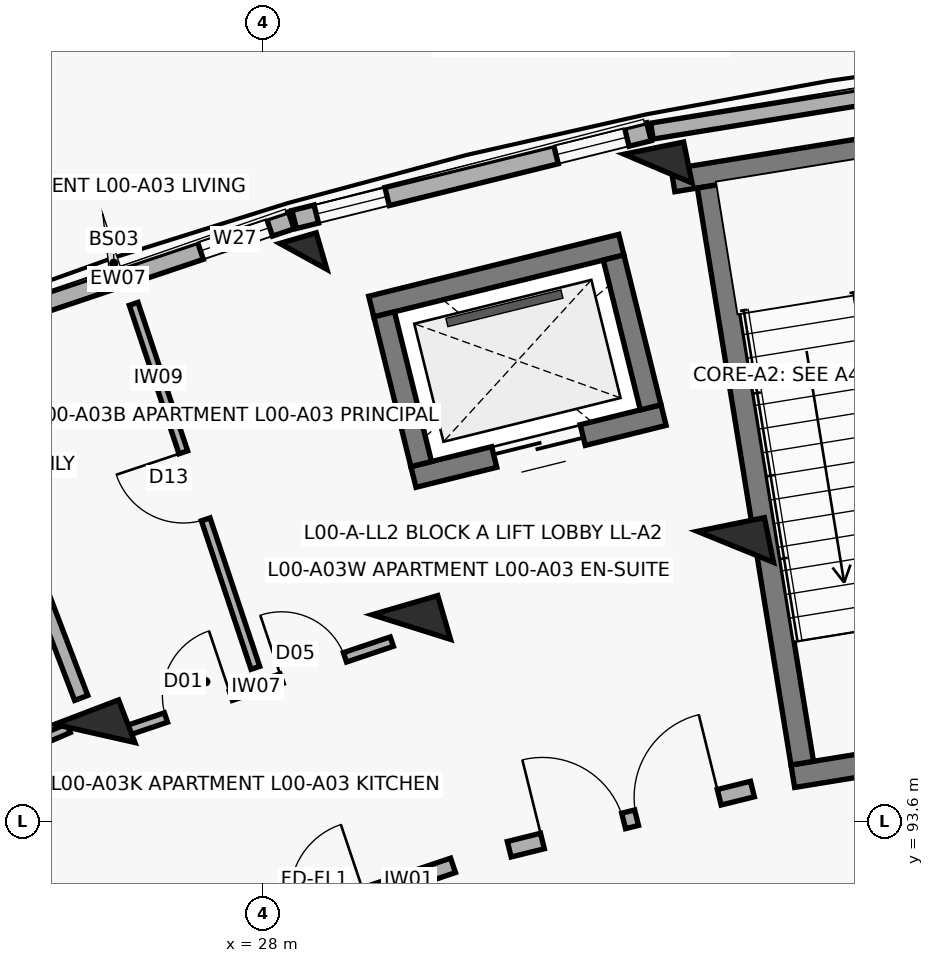
"""IFC4 building model, lengths in metres.
Left out: names, types, materials, properties, quantities, classifications, styles, units other than length and angle.
Written with IfcOpenShell. Run it as: python <this file> out.ifc"""

import sys

from ifc_helpers import new_model, si_unit, direction, frame, frame_2d, origin, origin_2d, place, context, subcontext, project, spatial, rectangle, extrude, element, fill, save


model = new_model("IFC4")
c1 = context("Model", 3, precision=1e-05, world=origin(), true_north=direction((0.0, 1.0)))
c2 = subcontext(c1, "Body", "Model", "MODEL_VIEW")
j1 = project(units=[si_unit("LENGTHUNIT", "METRE"), si_unit("PLANEANGLEUNIT", "RADIAN")], contexts=[c1])
p1 = place(None, origin())
s1 = spatial("IfcSite", under=j1, at=p1, CompositionType="ELEMENT")
p2 = place(p1, origin())
s2 = spatial("IfcBuilding", under=s1, at=p2, CompositionType="ELEMENT")
p3 = place(p2, origin())
s3 = spatial("IfcBuildingStorey", under=s2, at=p3, CompositionType="ELEMENT", Elevation=0.0)
for number, where, z_axis, x_axis in (
    (1, (25.79, 94.753, 0.0), (0.0, 0.0, 1.0), (-0.357, 0.934, 0.0)),
    (2, (29.954, 96.153, 0.0), (0.0, 0.0, 1.0), (-0.28, 0.96, 0.0)),
):
    element("IfcColumn", number, at=place(p3, frame(where, z_axis=z_axis, x_axis=x_axis)), inside=s3, PredefinedType="COLUMN", context=c2, shape_type="SweptSolid", body=[
        extrude(rectangle(XDim=0.6, YDim=0.9, at=origin_2d()), origin(), (0.0, 0.0, 1.0), 4.5),
    ])
p4 = place(p3, frame((28.533, 101.031, 0.0), z_axis=(0.0, 0.0, 1.0), x_axis=(-0.27966144946, 0.96009867914, 0.0)))
e3 = element("IfcColumn", 3, at=p4, inside=s3, PredefinedType="COLUMN", context=c2, shape_type="SweptSolid", body=[
    extrude(rectangle(XDim=0.5, YDim=0.5, at=origin_2d()), origin(), (0.0, 0.0, 1.0), 4.5),
])
p5 = place(p3, frame((34.219, 97.209, 0.0), z_axis=(0.0, 0.0, 1.0), x_axis=(-0.200393999665, 0.979715389742, 0.0)))
e4 = element("IfcColumn", 4, at=p5, inside=s3, PredefinedType="COLUMN", context=c2, shape_type="SweptSolid", body=[
    extrude(rectangle(XDim=0.6, YDim=0.9, at=origin_2d()), origin(), (0.0, 0.0, 1.0), 4.5),
])
p6 = place(p3, frame((33.201, 102.186, 0.0), z_axis=(0.0, 0.0, 1.0), x_axis=(-0.200393999665, 0.979715389742, 0.0)))
e5 = element("IfcColumn", 5, at=p6, inside=s3, PredefinedType="COLUMN", context=c2, shape_type="SweptSolid", body=[
    extrude(rectangle(XDim=0.55, YDim=0.8, at=origin_2d()), origin(), (0.0, 0.0, 1.0), 4.5),
])
p7 = place(p3, frame((23.816, 99.972, 0.0), z_axis=(0.0, 0.0, 1.0), x_axis=(0.947867898788, 0.318663531717, 0.0)))
e6 = element("IfcWall", 6, at=p7, inside=s3, PredefinedType="SOLIDWALL", context=c2, shape_type="SweptSolid", body=[
    extrude(rectangle(XDim=4.809, YDim=0.235, at=frame_2d((2.405, 0.0))), origin(), (0.0, 0.0, 1.0), 3.45),
])
p8 = place(p7, frame((0.3, 0.0, 0.3)))
e7 = element("IfcOpeningElement", 7, at=p8, cuts=e6, PredefinedType="OPENING", context=c2, shape_type="SweptSolid", body=[
    extrude(rectangle(XDim=0.96, YDim=1.42, at=frame_2d((0.48, 0.71))), frame((0.0, 0.127, 0.0), z_axis=(0.0, -1.0, 0.0), x_axis=(1.0, 0.0, 0.0)), (0.0, 0.0, 1.0), 0.255),
])
p9 = place(p7, frame((3.549, 0.0, 0.3)))
e8 = element("IfcOpeningElement", 8, at=p9, cuts=e6, PredefinedType="OPENING", context=c2, shape_type="SweptSolid", body=[
    extrude(rectangle(XDim=0.96, YDim=1.42, at=frame_2d((0.48, 0.71))), frame((0.0, 0.127, 0.0), z_axis=(0.0, -1.0, 0.0), x_axis=(1.0, 0.0, 0.0)), (0.0, 0.0, 1.0), 0.255),
])
p10 = place(p3, frame((28.413, 101.515, 0.0), z_axis=(0.0, 0.0, 1.0), x_axis=(0.970716115822, 0.240229520426, 0.0)))
e9 = element("IfcWall", 9, at=p10, inside=s3, PredefinedType="SOLIDWALL", context=c2, shape_type="SweptSolid", body=[
    extrude(rectangle(XDim=4.809, YDim=0.245, at=frame_2d((2.405, 0.0))), origin(), (0.0, 0.0, 1.0), 3.45),
])
p11 = place(p10, frame((0.3, 0.0, 0.3)))
e10 = element("IfcOpeningElement", 10, at=p11, cuts=e9, PredefinedType="OPENING", context=c2, shape_type="SweptSolid", body=[
    extrude(rectangle(XDim=0.96, YDim=1.56, at=frame_2d((0.48, 0.78))), frame((0.0, 0.133, 0.0), z_axis=(0.0, -1.0, 0.0), x_axis=(1.0, 0.0, 0.0)), (0.0, 0.0, 1.0), 0.265),
])
p12 = place(p10, frame((3.549, 0.0, 0.3)))
e11 = element("IfcOpeningElement", 11, at=p12, cuts=e9, PredefinedType="OPENING", context=c2, shape_type="SweptSolid", body=[
    extrude(rectangle(XDim=0.96, YDim=1.56, at=frame_2d((0.48, 0.78))), frame((0.0, 0.133, 0.0), z_axis=(0.0, -1.0, 0.0), x_axis=(1.0, 0.0, 0.0)), (0.0, 0.0, 1.0), 0.265),
])
p13 = place(p3, frame((33.12, 102.679, 0.0), z_axis=(0.0, 0.0, 1.0), x_axis=(0.987080750493, 0.160223568819, 0.0)))
e12 = element("IfcWall", 12, at=p13, inside=s3, PredefinedType="SOLIDWALL", context=c2, shape_type="SweptSolid", body=[
    extrude(rectangle(XDim=4.809, YDim=0.212, at=frame_2d((2.404, 0.0))), origin(), (0.0, 0.0, 1.0), 3.45),
])
p14 = place(p3, frame((38.794, 94.811, 0.0), z_axis=(0.0, 0.0, 1.0), x_axis=(-0.987077443397, -0.160243941341, 0.0)))
e13 = element("IfcWall", 13, at=p14, inside=s3, PredefinedType="SHEAR", context=c2, shape_type="SweptSolid", body=[
    extrude(rectangle(XDim=3.87, YDim=0.3, at=frame_2d((1.935, 0.0))), origin(), (0.0, 0.0, 1.0), 4.5),
])
p15 = place(p14, frame((1.41, 0.0, 0.0)))
e14 = element("IfcOpeningElement", 14, at=p15, cuts=e13, PredefinedType="OPENING", context=c2, shape_type="SweptSolid", body=[
    extrude(rectangle(XDim=1.05, YDim=2.15, at=frame_2d((0.525, 1.075))), frame((0.0, 0.16, 0.0), z_axis=(0.0, -1.0, 0.0), x_axis=(1.0, 0.0, 0.0)), (0.0, 0.0, 1.0), 0.32),
])
p16 = place(p3, frame((37.81, 102.745, 0.0), z_axis=(0.0, 0.0, 1.0), x_axis=(-0.987084710126, -0.160199173019, 0.0)))
e15 = element("IfcWall", 15, at=p16, inside=s3, PredefinedType="SHEAR", context=c2, shape_type="SweptSolid", body=[
    extrude(rectangle(XDim=4.47, YDim=0.3, at=frame_2d((2.235, 0.0))), origin(), (0.0, 0.0, 1.0), 4.5),
])
p17 = place(p3, frame((35.098, 94.363, 0.0), z_axis=(0.0, 0.0, 1.0), x_axis=(-0.160227496777, 0.987080112897, 0.0)))
e16 = element("IfcWall", 16, at=p17, inside=s3, PredefinedType="SHEAR", context=c2, shape_type="SweptSolid", body=[
    extrude(rectangle(XDim=7.69, YDim=0.3, at=frame_2d((3.845, 0.0))), origin(), (0.0, 0.0, 1.0), 4.5),
])
p18 = place(p3, frame((33.273, 98.942, 0.0), z_axis=(0.0, 0.0, 1.0), x_axis=(-0.970707542441, -0.240264160972, 0.0)))
e17 = element("IfcWall", 17, at=p18, inside=s3, PredefinedType="SHEAR", context=c2, shape_type="SweptSolid", body=[
    extrude(rectangle(XDim=3.39, YDim=0.28, at=frame_2d((1.695, 0.0))), origin(), (0.0, 0.0, 1.0), 4.5),
])
p19 = place(p18, frame((1.095, 0.0, 0.0)))
e18 = element("IfcOpeningElement", 18, at=p19, cuts=e17, PredefinedType="OPENING", context=c2, shape_type="SweptSolid", body=[
    extrude(rectangle(XDim=1.2, YDim=2.15, at=frame_2d((0.6, 1.075))), frame((0.0, 0.15, 0.0), z_axis=(0.0, -1.0, 0.0), x_axis=(1.0, 0.0, 0.0)), (0.0, 0.0, 1.0), 0.3),
])
p20 = place(p3, frame((32.718, 101.185, 0.0), z_axis=(0.0, 0.0, 1.0), x_axis=(-0.970711699588, -0.240247364777, 0.0)))
e19 = element("IfcWall", 19, at=p20, inside=s3, PredefinedType="SHEAR", context=c2, shape_type="SweptSolid", body=[
    extrude(rectangle(XDim=3.39, YDim=0.28, at=frame_2d((1.695, 0.0))), origin(), (0.0, 0.0, 1.0), 4.5),
])
p21 = place(p3, frame((33.104, 99.044, 0.0), z_axis=(0.0, 0.0, 1.0), x_axis=(-0.240186044774, 0.970726873995, 0.0)))
e20 = element("IfcWall", 20, at=p21, inside=s3, PredefinedType="SHEAR", context=c2, shape_type="SweptSolid", body=[
    extrude(rectangle(XDim=2.03, YDim=0.28, at=frame_2d((1.015, 0.0))), origin(), (0.0, 0.0, 1.0), 4.5),
])
p22 = place(p3, frame((30.085, 98.297, 0.0), z_axis=(0.0, 0.0, 1.0), x_axis=(-0.2402993748, 0.970698825832, 0.0)))
e21 = element("IfcWall", 21, at=p22, inside=s3, PredefinedType="SHEAR", context=c2, shape_type="SweptSolid", body=[
    extrude(rectangle(XDim=2.03, YDim=0.28, at=frame_2d((1.015, 0.0))), origin(), (0.0, 0.0, 1.0), 4.5),
])
p23 = place(p3, frame((21.943, 93.317, 0.0), z_axis=(0.0, 0.0, 1.0), x_axis=(0.918726854017, 0.394893615684, 0.0)))
e22 = element("IfcWall", 22, at=p23, inside=s3, PredefinedType="PARTITIONING", context=c2, shape_type="SweptSolid", body=[
    extrude(rectangle(XDim=3.81, YDim=0.125, at=frame_2d((1.905, 0.0))), origin(), (0.0, 0.0, 1.0), 3.34),
])
p24 = place(p23, frame((0.65, 0.0, 0.0)))
e23 = element("IfcOpeningElement", 23, at=p24, cuts=e22, PredefinedType="OPENING", context=c2, shape_type="SweptSolid", body=[
    extrude(rectangle(XDim=0.9, YDim=2.1, at=frame_2d((0.45, 1.05))), frame((0.0, 0.073, 0.0), z_axis=(0.0, -1.0, 0.0), x_axis=(1.0, 0.0, 0.0)), (0.0, 0.0, 1.0), 0.145),
])
p25 = place(p23, frame((2.28, 0.0, 0.0)))
e24 = element("IfcOpeningElement", 24, at=p25, cuts=e22, PredefinedType="OPENING", context=c2, shape_type="SweptSolid", body=[
    extrude(rectangle(XDim=0.88, YDim=2.1, at=frame_2d((0.44, 1.05))), frame((0.0, 0.073, 0.0), z_axis=(0.0, -1.0, 0.0), x_axis=(1.0, 0.0, 0.0)), (0.0, 0.0, 1.0), 0.145),
])
p26 = place(p3, frame((27.247, 91.923, 0.0), z_axis=(0.0, 0.0, 1.0), x_axis=(0.947863007629, 0.318678080151, 0.0)))
e25 = element("IfcWall", 25, at=p26, inside=s3, PredefinedType="SOLIDWALL", context=c2, shape_type="SweptSolid", body=[
    extrude(rectangle(XDim=3.436, YDim=0.2, at=frame_2d((1.718, 0.0))), origin(), (0.0, 0.0, 1.0), 3.34),
])
p27 = place(p26, frame((1.228, 0.0, 0.0)))
e26 = element("IfcOpeningElement", 26, at=p27, cuts=e25, PredefinedType="OPENING", context=c2, shape_type="SweptSolid", body=[
    extrude(rectangle(XDim=0.98, YDim=2.15, at=frame_2d((0.49, 1.075))), frame((0.0, 0.11, 0.0), z_axis=(0.0, -1.0, 0.0), x_axis=(1.0, 0.0, 0.0)), (0.0, 0.0, 1.0), 0.22),
])
p28 = place(p3, frame((26.11, 94.756, 0.0), z_axis=(0.0, 0.0, 1.0), x_axis=(0.947873924847, 0.318645606584, 0.0)))
e27 = element("IfcWall", 27, at=p28, inside=s3, PredefinedType="PARTITIONING", context=c2, shape_type="SweptSolid", body=[
    extrude(rectangle(XDim=3.785, YDim=0.13, at=frame_2d((1.893, 0.0))), origin(), (0.0, 0.0, 1.0), 3.34),
])
p29 = place(p28, frame((0.65, 0.0, 0.0)))
e28 = element("IfcOpeningElement", 28, at=p29, cuts=e27, PredefinedType="OPENING", context=c2, shape_type="SweptSolid", body=[
    extrude(rectangle(XDim=0.9, YDim=2.1, at=frame_2d((0.45, 1.05))), frame((0.0, 0.075, 0.0), z_axis=(0.0, -1.0, 0.0), x_axis=(1.0, 0.0, 0.0)), (0.0, 0.0, 1.0), 0.15),
])
p30 = place(p28, frame((2.255, 0.0, 0.0)))
e29 = element("IfcOpeningElement", 29, at=p30, cuts=e27, PredefinedType="OPENING", context=c2, shape_type="SweptSolid", body=[
    extrude(rectangle(XDim=0.88, YDim=2.1, at=frame_2d((0.44, 1.05))), frame((0.0, 0.075, 0.0), z_axis=(0.0, -1.0, 0.0), x_axis=(1.0, 0.0, 0.0)), (0.0, 0.0, 1.0), 0.15),
])
p31 = place(p3, frame((27.903, 95.616, 0.0), z_axis=(0.0, 0.0, 1.0), x_axis=(-0.31722829501, 0.948349201953, 0.0)))
e30 = element("IfcWall", 30, at=p31, inside=s3, PredefinedType="PARTITIONING", context=c2, shape_type="SweptSolid", body=[
    extrude(rectangle(XDim=5.05, YDim=0.12, at=frame_2d((2.525, 0.0))), origin(), (0.0, 0.0, 1.0), 3.34),
])
p32 = place(p31, frame((2.06, 0.0, 0.0)))
e31 = element("IfcOpeningElement", 31, at=p32, cuts=e30, PredefinedType="OPENING", context=c2, shape_type="SweptSolid", body=[
    extrude(rectangle(XDim=0.93, YDim=2.1, at=frame_2d((0.465, 1.05))), frame((0.0, 0.07, 0.0), z_axis=(0.0, -1.0, 0.0), x_axis=(1.0, 0.0, 0.0)), (0.0, 0.0, 1.0), 0.14),
])
p33 = place(p3, frame((25.611, 95.22, 0.0), z_axis=(0.0, 0.0, 1.0), x_axis=(-0.357064016205, 0.934079915388, 0.0)))
e32 = element("IfcWall", 32, at=p33, inside=s3, PredefinedType="SOLIDWALL", context=c2, shape_type="SweptSolid", body=[
    extrude(rectangle(XDim=4.35, YDim=0.185, at=frame_2d((2.175, 0.0))), origin(), (0.0, 0.0, 1.0), 3.34),
])
p34 = place(p3, frame((31.243, 93.23, 0.0), z_axis=(0.0, 0.0, 1.0), x_axis=(0.970719238682, 0.240216901263, 0.0)))
e33 = element("IfcWall", 33, at=p34, inside=s3, PredefinedType="SOLIDWALL", context=c2, shape_type="SweptSolid", body=[
    extrude(rectangle(XDim=3.296, YDim=0.21, at=frame_2d((1.648, 0.0))), origin(), (0.0, 0.0, 1.0), 3.34),
])
p35 = place(p34, frame((0.45, 0.0, 0.0)))
e34 = element("IfcOpeningElement", 34, at=p35, cuts=e33, PredefinedType="OPENING", context=c2, shape_type="SweptSolid", body=[
    extrude(rectangle(XDim=1.1, YDim=2.15, at=frame_2d((0.55, 1.075))), frame((0.0, 0.115, 0.0), z_axis=(0.0, -1.0, 0.0), x_axis=(1.0, 0.0, 0.0)), (0.0, 0.0, 1.0), 0.23),
])
p36 = place(p34, frame((1.726, 0.0, 0.0)))
e35 = element("IfcOpeningElement", 35, at=p36, cuts=e33, PredefinedType="OPENING", context=c2, shape_type="SweptSolid", body=[
    extrude(rectangle(XDim=1.12, YDim=2.15, at=frame_2d((0.56, 1.075))), frame((0.0, 0.115, 0.0), z_axis=(0.0, -1.0, 0.0), x_axis=(1.0, 0.0, 0.0)), (0.0, 0.0, 1.0), 0.23),
])
p37 = place(p3, frame((35.676, 92.181, 0.0), z_axis=(0.0, 0.0, 1.0), x_axis=(0.98707079686, 0.160284877599, 0.0)))
e36 = element("IfcWall", 36, at=p37, inside=s3, PredefinedType="SOLIDWALL", context=c2, shape_type="SweptSolid", body=[
    extrude(rectangle(XDim=3.129, YDim=0.21, at=frame_2d((1.564, 0.0))), origin(), (0.0, 0.0, 1.0), 3.34),
])
p38 = place(p37, frame((1.014, 0.0, 0.0)))
e37 = element("IfcOpeningElement", 37, at=p38, cuts=e36, PredefinedType="OPENING", context=c2, shape_type="SweptSolid", body=[
    extrude(rectangle(XDim=1.1, YDim=2.15, at=frame_2d((0.55, 1.075))), frame((0.0, 0.115, 0.0), z_axis=(0.0, -1.0, 0.0), x_axis=(1.0, 0.0, 0.0)), (0.0, 0.0, 1.0), 0.23),
])
p39 = place(p9, origin())
e38 = element("IfcWindow", 38, at=p39, inside=s3, PartitioningType="DOUBLE_PANEL_VERTICAL", PredefinedType="WINDOW", context=c2, shape_type="SweptSolid", body=[
    extrude(rectangle(XDim=0.96, YDim=1.42, at=frame_2d((0.48, 0.71))), frame((0.0, 0.03, 0.0), z_axis=(0.0, -1.0, 0.0), x_axis=(1.0, 0.0, 0.0)), (0.0, 0.0, 1.0), 0.06),
])
fill(e8, e38)
p40 = place(p11, origin())
e39 = element("IfcWindow", 39, at=p40, inside=s3, PartitioningType="DOUBLE_PANEL_VERTICAL", PredefinedType="WINDOW", context=c2, shape_type="SweptSolid", body=[
    extrude(rectangle(XDim=0.96, YDim=1.56, at=frame_2d((0.48, 0.78))), frame((0.0, 0.03, 0.0), z_axis=(0.0, -1.0, 0.0), x_axis=(1.0, 0.0, 0.0)), (0.0, 0.0, 1.0), 0.06),
])
fill(e10, e39)
p41 = place(p12, origin())
e40 = element("IfcWindow", 40, at=p41, inside=s3, PartitioningType="DOUBLE_PANEL_VERTICAL", PredefinedType="WINDOW", context=c2, shape_type="SweptSolid", body=[
    extrude(rectangle(XDim=0.96, YDim=1.56, at=frame_2d((0.48, 0.78))), frame((0.0, 0.03, 0.0), z_axis=(0.0, -1.0, 0.0), x_axis=(1.0, 0.0, 0.0)), (0.0, 0.0, 1.0), 0.06),
])
fill(e11, e40)
p42 = place(p19, origin())
e41 = element("IfcDoor", 41, at=p42, inside=s3, OperationType="DOUBLE_DOOR_SLIDING", PredefinedType="DOOR", context=c2, shape_type="SweptSolid", body=[
    extrude(rectangle(XDim=1.2, YDim=2.15, at=frame_2d((0.6, 1.075))), frame((0.0, 0.025, 0.0), z_axis=(0.0, -1.0, 0.0), x_axis=(1.0, 0.0, 0.0)), (0.0, 0.0, 1.0), 0.05),
])
fill(e18, e41)
p43 = place(p29, origin())
e42 = element("IfcDoor", 42, at=p43, inside=s3, OperationType="SINGLE_SWING_RIGHT", PredefinedType="DOOR", context=c2, shape_type="SweptSolid", body=[
    extrude(rectangle(XDim=0.9, YDim=2.1, at=frame_2d((0.45, 1.05))), frame((0.0, 0.025, 0.0), z_axis=(0.0, -1.0, 0.0), x_axis=(1.0, 0.0, 0.0)), (0.0, 0.0, 1.0), 0.05),
])
fill(e28, e42)
p44 = place(p30, origin())
e43 = element("IfcDoor", 43, at=p44, inside=s3, OperationType="SINGLE_SWING_LEFT", PredefinedType="DOOR", context=c2, shape_type="SweptSolid", body=[
    extrude(rectangle(XDim=0.88, YDim=2.1, at=frame_2d((0.44, 1.05))), frame((0.0, 0.025, 0.0), z_axis=(0.0, -1.0, 0.0), x_axis=(1.0, 0.0, 0.0)), (0.0, 0.0, 1.0), 0.05),
])
fill(e29, e43)
p45 = place(p32, origin())
e44 = element("IfcDoor", 44, at=p45, inside=s3, OperationType="SINGLE_SWING_RIGHT", PredefinedType="DOOR", context=c2, shape_type="SweptSolid", body=[
    extrude(rectangle(XDim=0.93, YDim=2.1, at=frame_2d((0.465, 1.05))), frame((0.0, 0.025, 0.0), z_axis=(0.0, -1.0, 0.0), x_axis=(1.0, 0.0, 0.0)), (0.0, 0.0, 1.0), 0.05),
])
fill(e31, e44)
p46 = place(p35, origin())
e45 = element("IfcDoor", 45, at=p46, inside=s3, OperationType="SINGLE_SWING_LEFT", PredefinedType="DOOR", context=c2, shape_type="SweptSolid", body=[
    extrude(rectangle(XDim=1.1, YDim=2.15, at=frame_2d((0.55, 1.075))), frame((0.0, 0.025, 0.0), z_axis=(0.0, -1.0, 0.0), x_axis=(1.0, 0.0, 0.0)), (0.0, 0.0, 1.0), 0.05),
])
fill(e34, e45)
p47 = place(p36, origin())
e46 = element("IfcDoor", 46, at=p47, inside=s3, OperationType="SINGLE_SWING_RIGHT", PredefinedType="DOOR", context=c2, shape_type="SweptSolid", body=[
    extrude(rectangle(XDim=1.12, YDim=2.15, at=frame_2d((0.56, 1.075))), frame((0.0, 0.025, 0.0), z_axis=(0.0, -1.0, 0.0), x_axis=(1.0, 0.0, 0.0)), (0.0, 0.0, 1.0), 0.05),
])
fill(e35, e46)
save(model, sys.argv[1])
